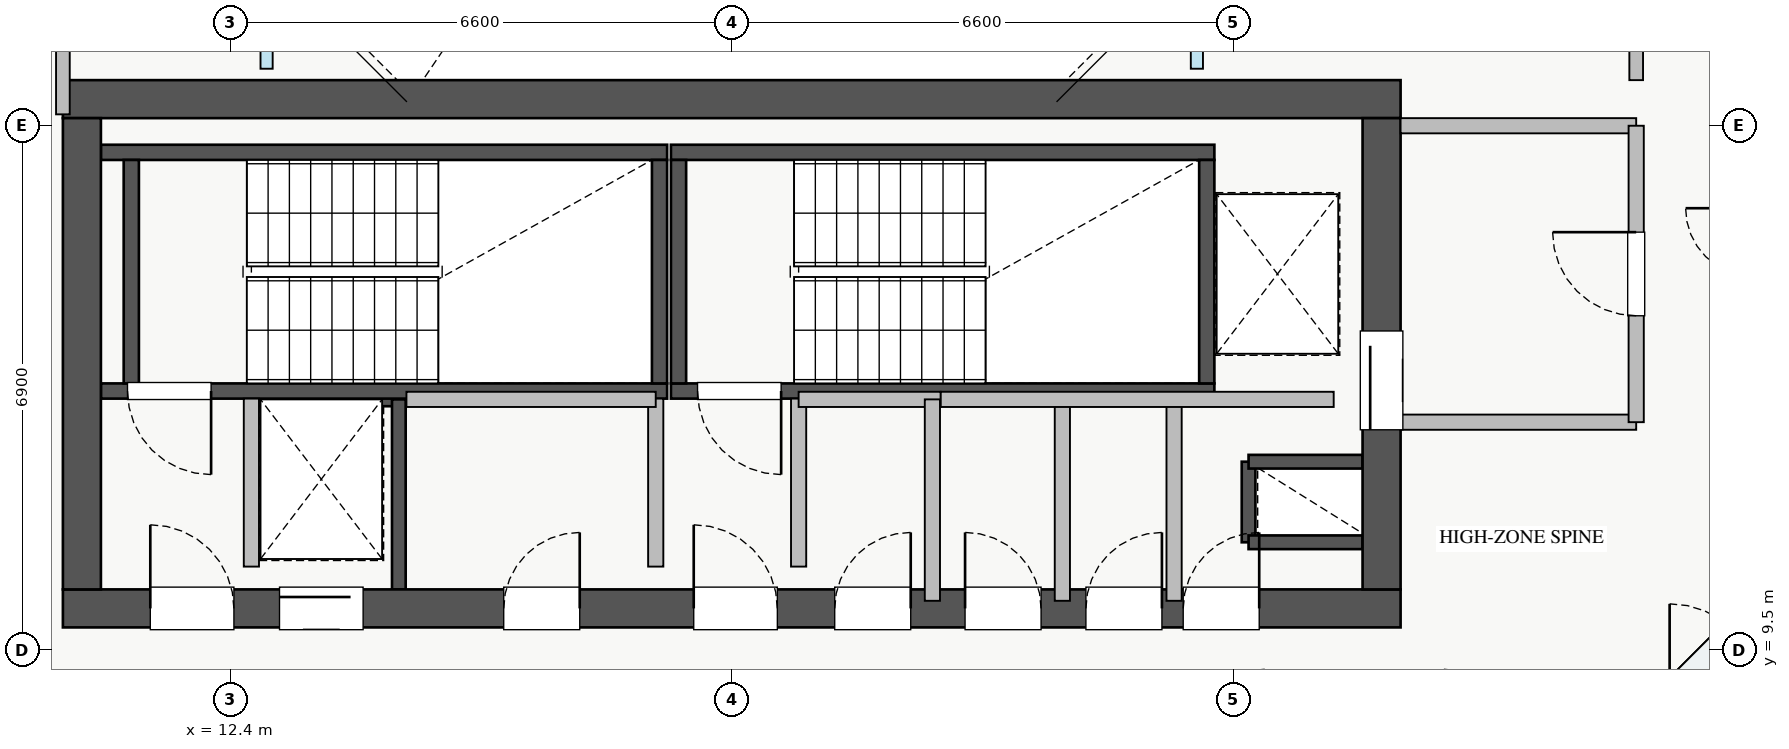
"""IFC4 building model, lengths in metres.
Left out: names, types, materials, properties, quantities, classifications, styles, units other than length and angle.
Written with IfcOpenShell. Run it as: python <this file> out.ifc"""

import sys

from ifc_helpers import new_model, si_unit, direction, frame, frame_2d, origin, place, context, subcontext, project, spatial, rectangle, extrude, source, transform, mapped, element, fill, save


model = new_model("IFC4")
c1 = context("Model", 3, precision=1e-05, world=origin(), true_north=direction((0.0, 1.0)))
c2 = subcontext(c1, "Body", "Model", "MODEL_VIEW")
j1 = project(units=[si_unit("LENGTHUNIT", "METRE"), si_unit("PLANEANGLEUNIT", "RADIAN")], contexts=[c1])
p1 = place(None, origin())
s1 = spatial("IfcSite", under=j1, at=p1, CompositionType="ELEMENT")
p2 = place(p1, origin())
s2 = spatial("IfcBuilding", under=s1, at=p2, CompositionType="ELEMENT")
p3 = place(p2, frame((0.0, 0.0, 203.5)))
s3 = spatial("IfcBuildingStorey", under=s2, at=p3, CompositionType="ELEMENT", Elevation=203.5)
p4 = place(p3, frame((12.68, 12.8, 0.0), z_axis=(0.0, 0.0, 1.0), x_axis=(1.0, 0.0, 0.0)))
e1 = element("IfcWall", 1, at=p4, inside=s3, PredefinedType="SHEAR", context=c2, shape_type="SweptSolid", body=[
    extrude(rectangle(XDim=1.94, YDim=0.18, at=frame_2d((0.97, 0.0))), origin(), (0.0, 0.0, 1.0), 3.07),
])
p5 = place(p3, frame((14.62, 10.3, 0.0), z_axis=(0.0, 0.0, 1.0), x_axis=(0.0, 1.0, 0.0)))
e2 = element("IfcWall", 2, at=p5, inside=s3, PredefinedType="SHEAR", context=c2, shape_type="SweptSolid", body=[
    extrude(rectangle(XDim=2.5, YDim=0.18, at=frame_2d((1.25, 0.0))), origin(), (0.0, 0.0, 1.0), 3.07),
])
p6 = place(p3, frame((25.8, 10.92, 0.0), z_axis=(0.0, 0.0, 1.0), x_axis=(0.0, 1.0, 0.0)))
e3 = element("IfcWall", 3, at=p6, inside=s3, PredefinedType="SHEAR", context=c2, shape_type="SweptSolid", body=[
    extrude(rectangle(XDim=1.06, YDim=0.18, at=frame_2d((0.53, 0.0))), origin(), (0.0, 0.0, 1.0), 3.07),
])
for number, where, z_axis, x_axis in (
    (4, (25.8, 11.98, 0.0), (0.0, 0.0, 1.0), (1.0, 0.0, 0.0)),
    (5, (25.8, 10.92, 0.0), (0.0, 0.0, 1.0), (1.0, 0.0, 0.0)),
):
    element("IfcWall", number, at=place(p3, frame(where, z_axis=z_axis, x_axis=x_axis)), inside=s3, PredefinedType="SHEAR", context=c2, shape_type="SweptSolid", body=[
        extrude(rectangle(XDim=1.5, YDim=0.18, at=frame_2d((0.75, 0.0))), origin(), (0.0, 0.0, 1.0), 3.07),
    ])
p7 = place(p3, frame((10.7, 12.91, 0.0), z_axis=(0.0, 0.0, 1.0), x_axis=(1.0, 0.0, 0.0)))
e6 = element("IfcWall", 6, at=p7, inside=s3, PredefinedType="SHEAR", context=c2, shape_type="SweptSolid", body=[
    extrude(rectangle(XDim=7.45, YDim=0.2, at=frame_2d((3.725, 0.0))), origin(), (0.0, 0.0, 1.0), 3.25),
])
p8 = place(p7, frame((0.35, 0.0, 0.0)))
e7 = element("IfcOpeningElement", 7, at=p8, cuts=e6, PredefinedType="OPENING", context=c2, shape_type="SweptSolid", body=[
    extrude(rectangle(XDim=1.1, YDim=2.05, at=frame_2d((0.55, 1.025))), frame((0.0, 0.11, 0.0), z_axis=(0.0, -1.0, 0.0), x_axis=(1.0, 0.0, 0.0)), (0.0, 0.0, 1.0), 0.22),
])
p9 = place(p3, frame((10.7, 16.05, 0.0), z_axis=(0.0, 0.0, 1.0), x_axis=(1.0, 0.0, 0.0)))
e8 = element("IfcWall", 8, at=p9, inside=s3, PredefinedType="SHEAR", context=c2, shape_type="SweptSolid", body=[
    extrude(rectangle(XDim=7.45, YDim=0.2, at=frame_2d((3.725, 0.0))), origin(), (0.0, 0.0, 1.0), 3.25),
])
for number, where, z_axis, x_axis in (
    (9, (11.1, 13.01, 0.0), (0.0, 0.0, 1.0), (0.0, 1.0, 0.0)),
    (10, (18.05, 13.01, 0.0), (0.0, 0.0, 1.0), (0.0, 1.0, 0.0)),
):
    element("IfcWall", number, at=place(p3, frame(where, z_axis=z_axis, x_axis=x_axis)), inside=s3, PredefinedType="SHEAR", context=c2, shape_type="SweptSolid", body=[
        extrude(rectangle(XDim=2.94, YDim=0.2, at=frame_2d((1.47, 0.0))), origin(), (0.0, 0.0, 1.0), 3.25),
    ])
p10 = place(p3, frame((18.2, 12.91, 0.0), z_axis=(0.0, 0.0, 1.0), x_axis=(1.0, 0.0, 0.0)))
e11 = element("IfcWall", 11, at=p10, inside=s3, PredefinedType="SHEAR", context=c2, shape_type="SweptSolid", body=[
    extrude(rectangle(XDim=7.15, YDim=0.2, at=frame_2d((3.575, 0.0))), origin(), (0.0, 0.0, 1.0), 3.25),
])
p11 = place(p10, frame((0.35, 0.0, 0.0)))
e12 = element("IfcOpeningElement", 12, at=p11, cuts=e11, PredefinedType="OPENING", context=c2, shape_type="SweptSolid", body=[
    extrude(rectangle(XDim=1.1, YDim=2.05, at=frame_2d((0.55, 1.025))), frame((0.0, 0.11, 0.0), z_axis=(0.0, -1.0, 0.0), x_axis=(1.0, 0.0, 0.0)), (0.0, 0.0, 1.0), 0.22),
])
p12 = place(p3, frame((18.2, 16.05, 0.0), z_axis=(0.0, 0.0, 1.0), x_axis=(1.0, 0.0, 0.0)))
e13 = element("IfcWall", 13, at=p12, inside=s3, PredefinedType="SHEAR", context=c2, shape_type="SweptSolid", body=[
    extrude(rectangle(XDim=7.15, YDim=0.2, at=frame_2d((3.575, 0.0))), origin(), (0.0, 0.0, 1.0), 3.25),
])
for number, where, z_axis, x_axis in (
    (14, (18.3, 13.01, 0.0), (0.0, 0.0, 1.0), (0.0, 1.0, 0.0)),
    (15, (25.25, 13.01, 0.0), (0.0, 0.0, 1.0), (0.0, 1.0, 0.0)),
):
    element("IfcWall", number, at=place(p3, frame(where, z_axis=z_axis, x_axis=x_axis)), inside=s3, PredefinedType="SHEAR", context=c2, shape_type="SweptSolid", body=[
        extrude(rectangle(XDim=2.94, YDim=0.2, at=frame_2d((1.47, 0.0))), origin(), (0.0, 0.0, 1.0), 3.25),
    ])
p13 = place(p3, frame((10.2, 10.05, 0.0), z_axis=(0.0, 0.0, 1.0), x_axis=(1.0, 0.0, 0.0)))
e16 = element("IfcWall", 16, at=p13, inside=s3, PredefinedType="SHEAR", context=c2, shape_type="SweptSolid", body=[
    extrude(rectangle(XDim=17.6, YDim=0.5, at=frame_2d((8.8, 0.0))), origin(), (0.0, 0.0, 1.0), 3.25),
])
p14 = place(p13, frame((1.15, 0.0, 0.0)))
e17 = element("IfcOpeningElement", 17, at=p14, cuts=e16, PredefinedType="OPENING", context=c2, shape_type="SweptSolid", body=[
    extrude(rectangle(XDim=1.1, YDim=2.05, at=frame_2d((0.55, 1.025))), frame((0.0, 0.26, 0.0), z_axis=(0.0, -1.0, 0.0), x_axis=(1.0, 0.0, 0.0)), (0.0, 0.0, 1.0), 0.52),
])
p15 = place(p13, frame((8.3, 0.0, 0.0)))
e18 = element("IfcOpeningElement", 18, at=p15, cuts=e16, PredefinedType="OPENING", context=c2, shape_type="SweptSolid", body=[
    extrude(rectangle(XDim=1.1, YDim=2.05, at=frame_2d((0.55, 1.025))), frame((0.0, 0.26, 0.0), z_axis=(0.0, -1.0, 0.0), x_axis=(1.0, 0.0, 0.0)), (0.0, 0.0, 1.0), 0.52),
])
p16 = place(p13, frame((2.85, 0.0, 0.0)))
e19 = element("IfcOpeningElement", 19, at=p16, cuts=e16, PredefinedType="OPENING", context=c2, shape_type="SweptSolid", body=[
    extrude(rectangle(XDim=1.1, YDim=2.05, at=frame_2d((0.55, 1.025))), frame((0.0, 0.26, 0.0), z_axis=(0.0, -1.0, 0.0), x_axis=(1.0, 0.0, 0.0)), (0.0, 0.0, 1.0), 0.52),
])
p17 = place(p13, frame((5.8, 0.0, 0.0)))
e20 = element("IfcOpeningElement", 20, at=p17, cuts=e16, PredefinedType="OPENING", context=c2, shape_type="SweptSolid", body=[
    extrude(rectangle(XDim=1.0, YDim=2.05, at=frame_2d((0.5, 1.025))), frame((0.0, 0.26, 0.0), z_axis=(0.0, -1.0, 0.0), x_axis=(1.0, 0.0, 0.0)), (0.0, 0.0, 1.0), 0.52),
])
p18 = place(p13, frame((14.74, 0.0, 0.0)))
e21 = element("IfcOpeningElement", 21, at=p18, cuts=e16, PredefinedType="OPENING", context=c2, shape_type="SweptSolid", body=[
    extrude(rectangle(XDim=1.0, YDim=2.05, at=frame_2d((0.5, 1.025))), frame((0.0, 0.26, 0.0), z_axis=(0.0, -1.0, 0.0), x_axis=(1.0, 0.0, 0.0)), (0.0, 0.0, 1.0), 0.52),
])
p19 = place(p13, frame((10.155, 0.0, 0.0)))
e22 = element("IfcOpeningElement", 22, at=p19, cuts=e16, PredefinedType="OPENING", context=c2, shape_type="SweptSolid", body=[
    extrude(rectangle(XDim=1.0, YDim=2.05, at=frame_2d((0.5, 1.025))), frame((0.0, 0.26, 0.0), z_axis=(0.0, -1.0, 0.0), x_axis=(1.0, 0.0, 0.0)), (0.0, 0.0, 1.0), 0.52),
])
p20 = place(p13, frame((11.87, 0.0, 0.0)))
e23 = element("IfcOpeningElement", 23, at=p20, cuts=e16, PredefinedType="OPENING", context=c2, shape_type="SweptSolid", body=[
    extrude(rectangle(XDim=1.0, YDim=2.05, at=frame_2d((0.5, 1.025))), frame((0.0, 0.26, 0.0), z_axis=(0.0, -1.0, 0.0), x_axis=(1.0, 0.0, 0.0)), (0.0, 0.0, 1.0), 0.52),
])
p21 = place(p13, frame((13.46, 0.0, 0.0)))
e24 = element("IfcOpeningElement", 24, at=p21, cuts=e16, PredefinedType="OPENING", context=c2, shape_type="SweptSolid", body=[
    extrude(rectangle(XDim=1.0, YDim=2.05, at=frame_2d((0.5, 1.025))), frame((0.0, 0.26, 0.0), z_axis=(0.0, -1.0, 0.0), x_axis=(1.0, 0.0, 0.0)), (0.0, 0.0, 1.0), 0.52),
])
p22 = place(p3, frame((10.2, 16.75, 0.0), z_axis=(0.0, 0.0, 1.0), x_axis=(1.0, 0.0, 0.0)))
e25 = element("IfcWall", 25, at=p22, inside=s3, PredefinedType="SHEAR", context=c2, shape_type="SweptSolid", body=[
    extrude(rectangle(XDim=17.6, YDim=0.5, at=frame_2d((8.8, 0.0))), origin(), (0.0, 0.0, 1.0), 3.25),
])
p23 = place(p3, frame((10.45, 10.3, 0.0), z_axis=(0.0, 0.0, 1.0), x_axis=(0.0, 1.0, 0.0)))
e26 = element("IfcWall", 26, at=p23, inside=s3, PredefinedType="SHEAR", context=c2, shape_type="SweptSolid", body=[
    extrude(rectangle(XDim=6.2, YDim=0.5, at=frame_2d((3.1, 0.0))), origin(), (0.0, 0.0, 1.0), 3.25),
])
p24 = place(p3, frame((27.55, 10.3, 0.0), z_axis=(0.0, 0.0, 1.0), x_axis=(0.0, 1.0, 0.0)))
e27 = element("IfcWall", 27, at=p24, inside=s3, PredefinedType="SHEAR", context=c2, shape_type="SweptSolid", body=[
    extrude(rectangle(XDim=6.2, YDim=0.5, at=frame_2d((3.1, 0.0))), origin(), (0.0, 0.0, 1.0), 3.25),
])
p25 = place(p24, frame((2.1, 0.0, 0.0)))
e28 = element("IfcOpeningElement", 28, at=p25, cuts=e27, PredefinedType="OPENING", context=c2, shape_type="SweptSolid", body=[
    extrude(rectangle(XDim=1.3, YDim=2.05, at=frame_2d((0.65, 1.025))), frame((0.0, 0.26, 0.0), z_axis=(0.0, -1.0, 0.0), x_axis=(1.0, 0.0, 0.0)), (0.0, 0.0, 1.0), 0.52),
])
p26 = place(p3, frame((27.8, 16.4, 0.0), z_axis=(0.0, 0.0, 1.0), x_axis=(1.0, 0.0, 0.0)))
e29 = element("IfcWall", 29, at=p26, inside=s3, PredefinedType="PARTITIONING", context=c2, shape_type="SweptSolid", body=[
    extrude(rectangle(XDim=3.1, YDim=0.2, at=frame_2d((1.55, 0.0))), origin(), (0.0, 0.0, 1.0), 3.07),
])
p27 = place(p3, frame((27.8, 12.5, 0.0), z_axis=(0.0, 0.0, 1.0), x_axis=(1.0, 0.0, 0.0)))
e30 = element("IfcWall", 30, at=p27, inside=s3, PredefinedType="PARTITIONING", context=c2, shape_type="SweptSolid", body=[
    extrude(rectangle(XDim=3.1, YDim=0.2, at=frame_2d((1.55, 0.0))), origin(), (0.0, 0.0, 1.0), 2.265),
])
p28 = place(p3, frame((30.9, 12.5, 0.0), z_axis=(0.0, 0.0, 1.0), x_axis=(0.0, 1.0, 0.0)))
e31 = element("IfcWall", 31, at=p28, inside=s3, PredefinedType="PARTITIONING", context=c2, shape_type="SweptSolid", body=[
    extrude(rectangle(XDim=3.9, YDim=0.2, at=frame_2d((1.95, 0.0))), origin(), (0.0, 0.0, 1.0), 3.07),
])
p29 = place(p28, frame((1.4, 0.0, 0.0)))
e32 = element("IfcOpeningElement", 32, at=p29, cuts=e31, PredefinedType="OPENING", context=c2, shape_type="SweptSolid", body=[
    extrude(rectangle(XDim=1.1, YDim=2.05, at=frame_2d((0.55, 1.025))), frame((0.0, 0.11, 0.0), z_axis=(0.0, -1.0, 0.0), x_axis=(1.0, 0.0, 0.0)), (0.0, 0.0, 1.0), 0.22),
])
for number, where, z_axis, x_axis in (
    (33, (12.68, 10.6, 0.0), (0.0, 0.0, 1.0), (0.0, 1.0, 0.0)),
    (34, (18.0, 10.6, 0.0), (0.0, 0.0, 1.0), (0.0, 1.0, 0.0)),
    (35, (19.88, 10.6, 0.0), (0.0, 0.0, 1.0), (0.0, 1.0, 0.0)),
):
    element("IfcWall", number, at=place(p3, frame(where, z_axis=z_axis, x_axis=x_axis)), inside=s3, PredefinedType="PARTITIONING", context=c2, shape_type="SweptSolid", body=[
        extrude(rectangle(XDim=2.21, YDim=0.2, at=frame_2d((1.105, 0.0))), origin(), (0.0, 0.0, 1.0), 3.07),
    ])
p30 = place(p3, frame((14.72, 12.8, 0.0), z_axis=(0.0, 0.0, 1.0), x_axis=(1.0, 0.0, 0.0)))
e36 = element("IfcWall", 36, at=p30, inside=s3, PredefinedType="PARTITIONING", context=c2, shape_type="SweptSolid", body=[
    extrude(rectangle(XDim=3.28, YDim=0.2, at=frame_2d((1.64, 0.0))), origin(), (0.0, 0.0, 1.0), 3.07),
])
p31 = place(p3, frame((24.82, 10.15, 0.0), z_axis=(0.0, 0.0, 1.0), x_axis=(0.0, 1.0, 0.0)))
e37 = element("IfcWall", 37, at=p31, inside=s3, PredefinedType="PARTITIONING", context=c2, shape_type="SweptSolid", body=[
    extrude(rectangle(XDim=2.65, YDim=0.2, at=frame_2d((1.325, 0.0))), origin(), (0.0, 0.0, 1.0), 3.07),
])
p32 = place(p3, frame((19.88, 12.8, 0.0), z_axis=(0.0, 0.0, 1.0), x_axis=(1.0, 0.0, 0.0)))
e38 = element("IfcWall", 38, at=p32, inside=s3, PredefinedType="PARTITIONING", context=c2, shape_type="SweptSolid", body=[
    extrude(rectangle(XDim=1.87, YDim=0.2, at=frame_2d((0.935, 0.0))), origin(), (0.0, 0.0, 1.0), 3.07),
])
for number, where, z_axis, x_axis in (
    (39, (21.64, 10.15, 0.0), (0.0, 0.0, 1.0), (0.0, 1.0, 0.0)),
    (40, (23.35, 10.15, 0.0), (0.0, 0.0, 1.0), (0.0, 1.0, 0.0)),
):
    element("IfcWall", number, at=place(p3, frame(where, z_axis=z_axis, x_axis=x_axis)), inside=s3, PredefinedType="PARTITIONING", context=c2, shape_type="SweptSolid", body=[
        extrude(rectangle(XDim=2.65, YDim=0.2, at=frame_2d((1.325, 0.0))), origin(), (0.0, 0.0, 1.0), 3.07),
    ])
p33 = place(p3, frame((21.75, 12.8, 0.0), z_axis=(0.0, 0.0, 1.0), x_axis=(1.0, 0.0, 0.0)))
e41 = element("IfcWall", 41, at=p33, inside=s3, PredefinedType="PARTITIONING", context=c2, shape_type="SweptSolid", body=[
    extrude(rectangle(XDim=5.17, YDim=0.2, at=frame_2d((2.585, 0.0))), origin(), (0.0, 0.0, 1.0), 3.07),
])
p34 = place(p3, frame((10.2, 16.55, 0.0), z_axis=(0.0, 0.0, 1.0), x_axis=(0.0, 1.0, 0.0)))
e42 = element("IfcWall", 42, at=p34, inside=s3, PredefinedType="PARTITIONING", context=c2, shape_type="SweptSolid", body=[
    extrude(rectangle(XDim=4.45, YDim=0.18, at=frame_2d((2.225, 0.0))), origin(), (0.0, 0.0, 1.0), 3.07),
])
p35 = place(p34, frame((2.025, 0.0, 0.0)))
e43 = element("IfcOpeningElement", 43, at=p35, cuts=e42, PredefinedType="OPENING", context=c2, shape_type="SweptSolid", body=[
    extrude(rectangle(XDim=0.85, YDim=2.05, at=frame_2d((0.425, 1.025))), frame((0.0, 0.1, 0.0), z_axis=(0.0, -1.0, 0.0), x_axis=(1.0, 0.0, 0.0)), (0.0, 0.0, 1.0), 0.2),
])
p36 = place(p3, frame((30.9, 17.0, 0.0), z_axis=(0.0, 0.0, 1.0), x_axis=(0.0, 1.0, 0.0)))
e44 = element("IfcWall", 44, at=p36, inside=s3, PredefinedType="PARTITIONING", context=c2, shape_type="SweptSolid", body=[
    extrude(rectangle(XDim=12.0, YDim=0.18, at=frame_2d((6.0, 0.0))), origin(), (0.0, 0.0, 1.0), 3.07),
])
p37 = place(p36, frame((0.93, 0.0, 0.0)))
e45 = element("IfcOpeningElement", 45, at=p37, cuts=e44, PredefinedType="OPENING", context=c2, shape_type="SweptSolid", body=[
    extrude(rectangle(XDim=1.0, YDim=2.05, at=frame_2d((0.5, 1.025))), frame((0.0, 0.1, 0.0), z_axis=(0.0, -1.0, 0.0), x_axis=(1.0, 0.0, 0.0)), (0.0, 0.0, 1.0), 0.2),
])
p38 = place(p36, frame((6.93, 0.0, 0.0)))
e46 = element("IfcOpeningElement", 46, at=p38, cuts=e44, PredefinedType="OPENING", context=c2, shape_type="SweptSolid", body=[
    extrude(rectangle(XDim=1.0, YDim=2.05, at=frame_2d((0.5, 1.025))), frame((0.0, 0.1, 0.0), z_axis=(0.0, -1.0, 0.0), x_axis=(1.0, 0.0, 0.0)), (0.0, 0.0, 1.0), 0.2),
])
m1 = source(origin(), c2, "Body", "SweptSolid", [
    extrude(rectangle(XDim=1.3, YDim=2.05, at=frame_2d((0.65, 1.025))), frame((0.0, 0.025, 0.0), z_axis=(0.0, -1.0, 0.0), x_axis=(1.0, 0.0, 0.0)), (0.0, 0.0, 1.0), 0.05),
])
p39 = place(p25, origin())
e47 = element("IfcDoor", 47, at=p39, inside=s3, OperationType="SLIDING_TO_RIGHT", PredefinedType="DOOR", context=c2, shape_type="MappedRepresentation", body=[
    mapped(m1, transform((0.0, 0.0, 0.0), x_axis=(1.0, 0.0, 0.0), y_axis=(0.0, 1.0, 0.0), z_axis=(0.0, 0.0, 1.0), scale=1.0)),
])
fill(e28, e47)
m2 = source(origin(), c2, "Body", "SweptSolid", [
    extrude(rectangle(XDim=1.1, YDim=2.05, at=frame_2d((0.55, 1.025))), frame((0.0, 0.025, 0.0), z_axis=(0.0, -1.0, 0.0), x_axis=(1.0, 0.0, 0.0)), (0.0, 0.0, 1.0), 0.05),
])
p40 = place(p14, origin())
e48 = element("IfcDoor", 48, at=p40, inside=s3, OperationType="SINGLE_SWING_LEFT", PredefinedType="DOOR", context=c2, shape_type="MappedRepresentation", body=[
    mapped(m2, transform((0.0, 0.0, 0.0), x_axis=(1.0, 0.0, 0.0), y_axis=(0.0, 1.0, 0.0), z_axis=(0.0, 0.0, 1.0), scale=1.0)),
])
fill(e17, e48)
p41 = place(p8, frame((1.1, 0.0, 0.0), z_axis=(0.0, 0.0, 1.0), x_axis=(-1.0, 0.0, 0.0)))
e49 = element("IfcDoor", 49, at=p41, inside=s3, OperationType="SINGLE_SWING_RIGHT", PredefinedType="DOOR", context=c2, shape_type="MappedRepresentation", body=[
    mapped(m2, transform((0.0, 0.0, 0.0), x_axis=(1.0, 0.0, 0.0), y_axis=(0.0, 1.0, 0.0), z_axis=(0.0, 0.0, 1.0), scale=1.0)),
])
fill(e7, e49)
p42 = place(p15, origin())
e50 = element("IfcDoor", 50, at=p42, inside=s3, OperationType="SINGLE_SWING_LEFT", PredefinedType="DOOR", context=c2, shape_type="MappedRepresentation", body=[
    mapped(m2, transform((0.0, 0.0, 0.0), x_axis=(1.0, 0.0, 0.0), y_axis=(0.0, 1.0, 0.0), z_axis=(0.0, 0.0, 1.0), scale=1.0)),
])
fill(e18, e50)
p43 = place(p11, frame((1.1, 0.0, 0.0), z_axis=(0.0, 0.0, 1.0), x_axis=(-1.0, 0.0, 0.0)))
e51 = element("IfcDoor", 51, at=p43, inside=s3, OperationType="SINGLE_SWING_RIGHT", PredefinedType="DOOR", context=c2, shape_type="MappedRepresentation", body=[
    mapped(m2, transform((0.0, 0.0, 0.0), x_axis=(1.0, 0.0, 0.0), y_axis=(0.0, 1.0, 0.0), z_axis=(0.0, 0.0, 1.0), scale=1.0)),
])
fill(e12, e51)
p44 = place(p16, origin())
e52 = element("IfcDoor", 52, at=p44, inside=s3, OperationType="SLIDING_TO_RIGHT", PredefinedType="DOOR", context=c2, shape_type="MappedRepresentation", body=[
    mapped(m2, transform((0.0, 0.0, 0.0), x_axis=(1.0, 0.0, 0.0), y_axis=(0.0, 1.0, 0.0), z_axis=(0.0, 0.0, 1.0), scale=1.0)),
])
fill(e19, e52)
m3 = source(origin(), c2, "Body", "SweptSolid", [
    extrude(rectangle(XDim=1.0, YDim=2.05, at=frame_2d((0.5, 1.025))), frame((0.0, 0.025, 0.0), z_axis=(0.0, -1.0, 0.0), x_axis=(1.0, 0.0, 0.0)), (0.0, 0.0, 1.0), 0.05),
])
p45 = place(p17, origin())
e53 = element("IfcDoor", 53, at=p45, inside=s3, OperationType="SINGLE_SWING_RIGHT", PredefinedType="DOOR", context=c2, shape_type="MappedRepresentation", body=[
    mapped(m3, transform((0.0, 0.0, 0.0), x_axis=(1.0, 0.0, 0.0), y_axis=(0.0, 1.0, 0.0), z_axis=(0.0, 0.0, 1.0), scale=1.0)),
])
fill(e20, e53)
p46 = place(p18, origin())
e54 = element("IfcDoor", 54, at=p46, inside=s3, OperationType="SINGLE_SWING_RIGHT", PredefinedType="DOOR", context=c2, shape_type="MappedRepresentation", body=[
    mapped(m3, transform((0.0, 0.0, 0.0), x_axis=(1.0, 0.0, 0.0), y_axis=(0.0, 1.0, 0.0), z_axis=(0.0, 0.0, 1.0), scale=1.0)),
])
fill(e21, e54)
p47 = place(p19, origin())
e55 = element("IfcDoor", 55, at=p47, inside=s3, OperationType="SINGLE_SWING_RIGHT", PredefinedType="DOOR", context=c2, shape_type="MappedRepresentation", body=[
    mapped(m3, transform((0.0, 0.0, 0.0), x_axis=(1.0, 0.0, 0.0), y_axis=(0.0, 1.0, 0.0), z_axis=(0.0, 0.0, 1.0), scale=1.0)),
])
fill(e22, e55)
p48 = place(p20, origin())
e56 = element("IfcDoor", 56, at=p48, inside=s3, OperationType="SINGLE_SWING_LEFT", PredefinedType="DOOR", context=c2, shape_type="MappedRepresentation", body=[
    mapped(m3, transform((0.0, 0.0, 0.0), x_axis=(1.0, 0.0, 0.0), y_axis=(0.0, 1.0, 0.0), z_axis=(0.0, 0.0, 1.0), scale=1.0)),
])
fill(e23, e56)
p49 = place(p21, origin())
e57 = element("IfcDoor", 57, at=p49, inside=s3, OperationType="SINGLE_SWING_RIGHT", PredefinedType="DOOR", context=c2, shape_type="MappedRepresentation", body=[
    mapped(m3, transform((0.0, 0.0, 0.0), x_axis=(1.0, 0.0, 0.0), y_axis=(0.0, 1.0, 0.0), z_axis=(0.0, 0.0, 1.0), scale=1.0)),
])
fill(e24, e57)
p50 = place(p29, origin())
e58 = element("IfcDoor", 58, at=p50, inside=s3, OperationType="SINGLE_SWING_RIGHT", PredefinedType="DOOR", context=c2, shape_type="MappedRepresentation", body=[
    mapped(m2, transform((0.0, 0.0, 0.0), x_axis=(1.0, 0.0, 0.0), y_axis=(0.0, 1.0, 0.0), z_axis=(0.0, 0.0, 1.0), scale=1.0)),
])
fill(e32, e58)
save(model, sys.argv[1])
